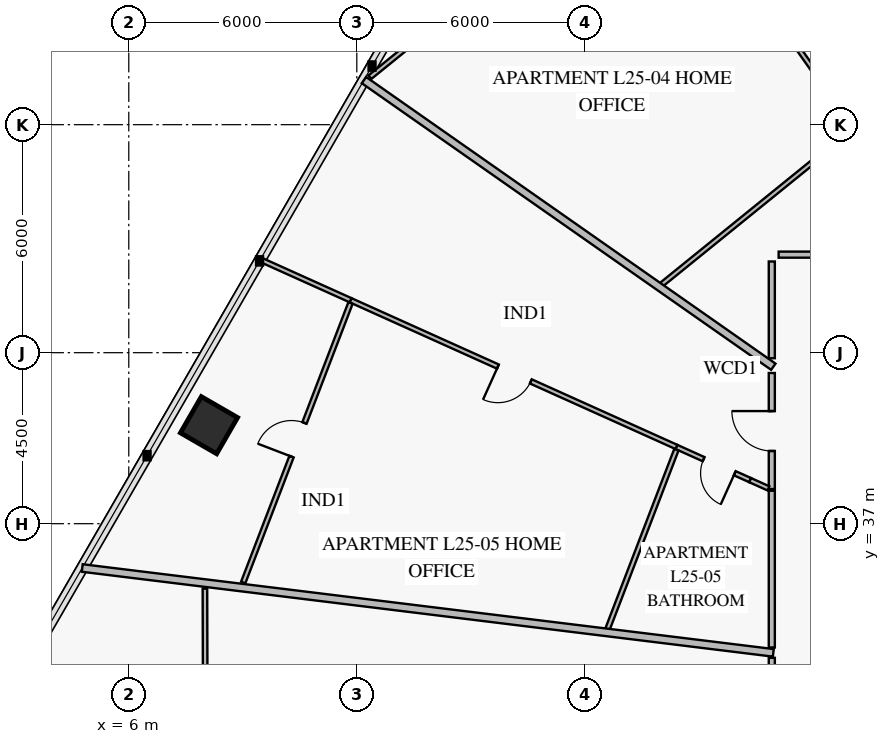
"""IFC4 building model, lengths in metres.
Left out: names, types, materials, properties, quantities, classifications, styles, units other than length and angle.
Written with IfcOpenShell. Run it as: python <this file> out.ifc"""

import sys

from ifc_helpers import new_model, si_unit, direction, frame, frame_2d, origin, origin_2d, place, context, subcontext, project, spatial, rectangle, extrude, element, fill, save


model = new_model("IFC4")
c1 = context("Model", 3, precision=1e-05, world=origin(), true_north=direction((0.0, 1.0)))
c2 = subcontext(c1, "Body", "Model", "MODEL_VIEW")
j1 = project(units=[si_unit("LENGTHUNIT", "METRE"), si_unit("PLANEANGLEUNIT", "RADIAN")], contexts=[c1])
p1 = place(None, origin())
s1 = spatial("IfcSite", under=j1, at=p1, CompositionType="ELEMENT")
p2 = place(p1, origin())
s2 = spatial("IfcBuilding", under=s1, at=p2, CompositionType="ELEMENT")
p3 = place(p2, frame((0.0, 0.0, 103.8)))
s3 = spatial("IfcBuildingStorey", under=s2, at=p3, CompositionType="ELEMENT", Elevation=103.8)
p4 = place(p3, frame((8.111, 39.592, 0.0), z_axis=(0.0, 0.0, 1.0), x_axis=(-0.5, -0.866025403784, 0.0)))
e1 = element("IfcColumn", 1, at=p4, inside=s3, PredefinedType="COLUMN", context=c2, shape_type="SweptSolid", body=[
    extrude(rectangle(XDim=1.1, YDim=1.1, at=origin_2d()), origin(), (0.0, 0.0, 1.0), 3.55),
])
p5 = place(p3, frame((25.085, 47.427, 0.0), z_axis=(0.0, 0.0, 1.0), x_axis=(-0.577572190058, 0.81633961393, 0.0)))
e2 = element("IfcWall", 2, at=p5, inside=s3, PredefinedType="PARTITIONING", context=c2, shape_type="SweptSolid", body=[
    extrude(rectangle(XDim=7.275, YDim=0.12, at=frame_2d((3.638, 0.0))), origin(), (0.0, 0.0, 1.0), 3.1),
])
p6 = place(p5, frame((4.044, 0.0, 0.0)))
e3 = element("IfcOpeningElement", 3, at=p6, cuts=e2, PredefinedType="OPENING", context=c2, shape_type="SweptSolid", body=[
    extrude(rectangle(XDim=0.95, YDim=2.1, at=frame_2d((0.475, 1.05))), frame((0.0, 0.072, 0.0), z_axis=(0.0, -1.0, 0.0), x_axis=(1.0, 0.0, 0.0)), (0.0, 0.0, 1.0), 0.144),
])
p7 = place(p3, frame((19.797, 54.784, 0.0), z_axis=(0.0, 0.0, 1.0), x_axis=(-0.777151172812, -0.629313955508, 0.0)))
e4 = element("IfcWall", 4, at=p7, inside=s3, PredefinedType="PARTITIONING", context=c2, shape_type="SweptSolid", body=[
    extrude(rectangle(XDim=9.588, YDim=0.12, at=frame_2d((4.794, 0.0))), origin(), (0.0, 0.0, 1.0), 2.8),
])
p8 = place(p7, frame((2.552, 0.0, 0.0)))
e5 = element("IfcOpeningElement", 5, at=p8, cuts=e4, PredefinedType="OPENING", context=c2, shape_type="SweptSolid", body=[
    extrude(rectangle(XDim=0.95, YDim=2.1, at=frame_2d((0.475, 1.05))), frame((0.0, 0.072, 0.0), z_axis=(0.0, -1.0, 0.0), x_axis=(1.0, 0.0, 0.0)), (0.0, 0.0, 1.0), 0.144),
])
p9 = place(p3, frame((22.35, 38.146, 0.0), z_axis=(0.0, 0.0, 1.0), x_axis=(-0.911826982845, 0.410574662341, 0.0)))
e6 = element("IfcWall", 6, at=p9, inside=s3, PredefinedType="PARTITIONING", context=c2, shape_type="SweptSolid", body=[
    extrude(rectangle(XDim=2.127, YDim=0.12, at=frame_2d((1.063, 0.0))), origin(), (0.0, 0.0, 1.0), 3.55),
])
p10 = place(p9, frame((0.443, 0.0, 0.0)))
e7 = element("IfcOpeningElement", 7, at=p10, cuts=e6, PredefinedType="OPENING", context=c2, shape_type="SweptSolid", body=[
    extrude(rectangle(XDim=0.9, YDim=2.1, at=frame_2d((0.45, 1.05))), frame((0.0, 0.072, 0.0), z_axis=(0.0, -1.0, 0.0), x_axis=(1.0, 0.0, 0.0)), (0.0, 0.0, 1.0), 0.144),
])
p11 = place(p3, frame((20.411, 39.019, 0.0), z_axis=(0.0, 0.0, 1.0), x_axis=(-0.911837449282, 0.410551417104, 0.0)))
e8 = element("IfcWall", 8, at=p11, inside=s3, PredefinedType="PARTITIONING", context=c2, shape_type="SweptSolid", body=[
    extrude(rectangle(XDim=9.404, YDim=0.12, at=frame_2d((4.702, 0.0))), origin(), (0.0, 0.0, 1.0), 3.1),
])
p12 = place(p11, frame((4.202, 0.0, 0.0)))
e9 = element("IfcOpeningElement", 9, at=p12, cuts=e8, PredefinedType="OPENING", context=c2, shape_type="SweptSolid", body=[
    extrude(rectangle(XDim=0.95, YDim=2.1, at=frame_2d((0.475, 1.05))), frame((0.0, 0.072, 0.0), z_axis=(0.0, -1.0, 0.0), x_axis=(1.0, 0.0, 0.0)), (0.0, 0.0, 1.0), 0.144),
])
p13 = place(p3, frame((11.834, 42.806, 0.0), z_axis=(0.0, 0.0, 1.0), x_axis=(-0.358347623064, -0.933588228848, 0.0)))
e10 = element("IfcWall", 10, at=p13, inside=s3, PredefinedType="PARTITIONING", context=c2, shape_type="SweptSolid", body=[
    extrude(rectangle(XDim=7.877, YDim=0.12, at=frame_2d((3.938, 0.0))), origin(), (0.0, 0.0, 1.0), 2.85),
])
p14 = place(p13, frame((3.379, 0.0, 0.0)))
e11 = element("IfcOpeningElement", 11, at=p14, cuts=e10, PredefinedType="OPENING", context=c2, shape_type="SweptSolid", body=[
    extrude(rectangle(XDim=0.95, YDim=2.1, at=frame_2d((0.475, 1.05))), frame((0.0, 0.072, 0.0), z_axis=(0.0, -1.0, 0.0), x_axis=(1.0, 0.0, 0.0)), (0.0, 0.0, 1.0), 0.144),
])
p15 = place(p3, frame((22.92, 40.965, 0.0), z_axis=(0.0, 0.0, 1.0), x_axis=(0.0, -1.0, 0.0)))
e12 = element("IfcWall", 12, at=p15, inside=s3, PredefinedType="PARTITIONING", context=c2, shape_type="SweptSolid", body=[
    extrude(rectangle(XDim=3.054, YDim=0.16, at=frame_2d((1.527, 0.0))), origin(), (0.0, 0.0, 1.0), 3.55),
])
p16 = place(p15, frame((1.002, 0.0, 0.0)))
e13 = element("IfcOpeningElement", 13, at=p16, cuts=e12, PredefinedType="OPENING", context=c2, shape_type="SweptSolid", body=[
    extrude(rectangle(XDim=1.05, YDim=2.15, at=frame_2d((0.525, 1.075))), frame((0.0, 0.092, 0.0), z_axis=(0.0, -1.0, 0.0), x_axis=(1.0, 0.0, 0.0)), (0.0, 0.0, 1.0), 0.184),
])
p17 = place(p3, frame((8.004, 35.29, 0.0), z_axis=(0.0, 0.0, 1.0), x_axis=(0.00282658773, -0.999996005193, 0.0)))
e14 = element("IfcWall", 14, at=p17, inside=s3, PredefinedType="PARTITIONING", context=c2, shape_type="SweptSolid", body=[
    extrude(rectangle(XDim=6.737, YDim=0.12, at=frame_2d((3.369, 0.0))), origin(), (0.0, 0.0, 1.0), 2.8),
])
p18 = place(p17, frame((2.894, 0.0, 0.0)))
e15 = element("IfcOpeningElement", 15, at=p18, cuts=e14, PredefinedType="OPENING", context=c2, shape_type="SweptSolid", body=[
    extrude(rectangle(XDim=0.95, YDim=2.1, at=frame_2d((0.475, 1.05))), frame((0.0, 0.072, 0.0), z_axis=(0.0, -1.0, 0.0), x_axis=(1.0, 0.0, 0.0)), (0.0, 0.0, 1.0), 0.144),
])
p19 = place(p3, frame((22.92, 33.47, 0.0), z_axis=(0.0, 0.0, 1.0), x_axis=(0.0, -1.0, 0.0)))
e16 = element("IfcWall", 16, at=p19, inside=s3, PredefinedType="PARTITIONING", context=c2, shape_type="SweptSolid", body=[
    extrude(rectangle(XDim=3.014, YDim=0.16, at=frame_2d((1.507, 0.0))), origin(), (0.0, 0.0, 1.0), 3.55),
])
p20 = place(p19, frame((0.982, 0.0, 0.0)))
e17 = element("IfcOpeningElement", 17, at=p20, cuts=e16, PredefinedType="OPENING", context=c2, shape_type="SweptSolid", body=[
    extrude(rectangle(XDim=1.05, YDim=2.15, at=frame_2d((0.525, 1.075))), frame((0.0, 0.092, 0.0), z_axis=(0.0, -1.0, 0.0), x_axis=(1.0, 0.0, 0.0)), (0.0, 0.0, 1.0), 0.184),
])
p21 = place(p3, frame((30.889, 44.04, 0.0), z_axis=(0.0, 0.0, 1.0), x_axis=(-0.39073950449, 0.920501298006, 0.0)))
e18 = element("IfcWall", 18, at=p21, inside=s3, PredefinedType="PARTITIONING", context=c2, shape_type="SweptSolid", body=[
    extrude(rectangle(XDim=18.38, YDim=0.2, at=frame_2d((9.19, 0.0))), origin(), (0.0, 0.0, 1.0), 2.8),
])
p22 = place(p3, frame((25.046, 47.364, 0.0), z_axis=(0.0, 0.0, 1.0), x_axis=(-0.777136993878, -0.629331464926, 0.0)))
e19 = element("IfcWall", 19, at=p22, inside=s3, PredefinedType="PARTITIONING", context=c2, shape_type="SweptSolid", body=[
    extrude(rectangle(XDim=6.483, YDim=0.12, at=frame_2d((3.242, 0.0))), origin(), (0.0, 0.0, 1.0), 2.85),
])
p23 = place(p3, frame((22.96, 41.131, 0.0), z_axis=(0.0, 0.0, 1.0), x_axis=(-0.819148180014, 0.573581955068, 0.0)))
e20 = element("IfcWall", 20, at=p23, inside=s3, PredefinedType="PARTITIONING", context=c2, shape_type="SweptSolid", body=[
    extrude(rectangle(XDim=13.15, YDim=0.2, at=frame_2d((6.575, 0.0))), origin(), (0.0, 0.0, 1.0), 2.8),
])
p24 = place(p3, frame((22.832, 37.929, 0.0), z_axis=(0.0, 0.0, 1.0), x_axis=(-0.911800467551, 0.410633543897, 0.0)))
e21 = element("IfcWall", 21, at=p24, inside=s3, PredefinedType="PARTITIONING", context=c2, shape_type="SweptSolid", body=[
    extrude(rectangle(XDim=0.529, YDim=0.12, at=frame_2d((0.264, 0.0))), origin(), (0.0, 0.0, 1.0), 3.55),
])
p25 = place(p3, frame((11.836, 42.88, 0.0), z_axis=(0.0, 0.0, 1.0), x_axis=(-0.911821705631, 0.410586382068, 0.0)))
e22 = element("IfcWall", 22, at=p25, inside=s3, PredefinedType="PARTITIONING", context=c2, shape_type="SweptSolid", body=[
    extrude(rectangle(XDim=2.61, YDim=0.12, at=frame_2d((1.305, 0.0))), origin(), (0.0, 0.0, 1.0), 2.8),
])
p26 = place(p3, frame((20.409, 38.945, 0.0), z_axis=(0.0, 0.0, 1.0), x_axis=(-0.358374938657, -0.933577743598, 0.0)))
e23 = element("IfcWall", 23, at=p26, inside=s3, PredefinedType="PARTITIONING", context=c2, shape_type="SweptSolid", body=[
    extrude(rectangle(XDim=5.092, YDim=0.12, at=frame_2d((2.546, 0.0))), origin(), (0.0, 0.0, 1.0), 2.85),
])
p27 = place(p3, frame((22.96, 33.601, 0.0), z_axis=(0.0, 0.0, 1.0), x_axis=(-0.99254551981, 0.121874489148, 0.0)))
e24 = element("IfcWall", 24, at=p27, inside=s3, PredefinedType="PARTITIONING", context=c2, shape_type="SweptSolid", body=[
    extrude(rectangle(XDim=18.321, YDim=0.2, at=frame_2d((9.161, 0.0))), origin(), (0.0, 0.0, 1.0), 2.8),
])
p28 = place(p3, frame((27.37, 44.08, 0.0), z_axis=(0.0, 0.0, 1.0), x_axis=(-1.0, 0.0, 0.0)))
e25 = element("IfcWall", 25, at=p28, inside=s3, PredefinedType="PARTITIONING", context=c2, shape_type="SweptSolid", body=[
    extrude(rectangle(XDim=4.27, YDim=0.16, at=frame_2d((2.135, 0.0))), origin(), (0.0, 0.0, 1.0), 2.85),
])
p29 = place(p3, frame((22.92, 43.9, 0.0), z_axis=(0.0, 0.0, 1.0), x_axis=(0.0, -1.0, 0.0)))
e26 = element("IfcWall", 26, at=p29, inside=s3, PredefinedType="PARTITIONING", context=c2, shape_type="SweptSolid", body=[
    extrude(rectangle(XDim=2.545, YDim=0.16, at=frame_2d((1.273, 0.0))), origin(), (0.0, 0.0, 1.0), 3.55),
])
p30 = place(p3, frame((22.92, 37.867, 0.0), z_axis=(0.0, 0.0, 1.0), x_axis=(0.0, -1.0, 0.0)))
e27 = element("IfcWall", 27, at=p30, inside=s3, PredefinedType="PARTITIONING", context=c2, shape_type="SweptSolid", body=[
    extrude(rectangle(XDim=4.125, YDim=0.16, at=frame_2d((2.062, 0.0))), origin(), (0.0, 0.0, 1.0), 2.85),
])
p31 = place(p10, origin())
e28 = element("IfcDoor", 28, at=p31, inside=s3, OperationType="SINGLE_SWING_LEFT", PredefinedType="DOOR", context=c2, shape_type="SweptSolid", body=[
    extrude(rectangle(XDim=0.9, YDim=2.1, at=frame_2d((0.45, 1.05))), frame((0.0, 0.025, 0.0), z_axis=(0.0, -1.0, 0.0), x_axis=(1.0, 0.0, 0.0)), (0.0, 0.0, 1.0), 0.05),
])
fill(e7, e28)
p32 = place(p12, origin())
e29 = element("IfcDoor", 29, at=p32, inside=s3, OperationType="SINGLE_SWING_RIGHT", PredefinedType="DOOR", context=c2, shape_type="SweptSolid", body=[
    extrude(rectangle(XDim=0.95, YDim=2.1, at=frame_2d((0.475, 1.05))), frame((0.0, 0.025, 0.0), z_axis=(0.0, -1.0, 0.0), x_axis=(1.0, 0.0, 0.0)), (0.0, 0.0, 1.0), 0.05),
])
fill(e9, e29)
p33 = place(p14, frame((0.95, 0.0, 0.0), z_axis=(0.0, 0.0, 1.0), x_axis=(-1.0, 0.0, 0.0)))
e30 = element("IfcDoor", 30, at=p33, inside=s3, OperationType="SINGLE_SWING_LEFT", PredefinedType="DOOR", context=c2, shape_type="SweptSolid", body=[
    extrude(rectangle(XDim=0.95, YDim=2.1, at=frame_2d((0.475, 1.05))), frame((0.0, 0.025, 0.0), z_axis=(0.0, -1.0, 0.0), x_axis=(1.0, 0.0, 0.0)), (0.0, 0.0, 1.0), 0.05),
])
fill(e11, e30)
p34 = place(p16, frame((1.05, 0.0, 0.0), z_axis=(0.0, 0.0, 1.0), x_axis=(-1.0, 0.0, 0.0)))
e31 = element("IfcDoor", 31, at=p34, inside=s3, OperationType="SINGLE_SWING_RIGHT", PredefinedType="DOOR", context=c2, shape_type="SweptSolid", body=[
    extrude(rectangle(XDim=1.05, YDim=2.15, at=frame_2d((0.525, 1.075))), frame((0.0, 0.025, 0.0), z_axis=(0.0, -1.0, 0.0), x_axis=(1.0, 0.0, 0.0)), (0.0, 0.0, 1.0), 0.05),
])
fill(e13, e31)
save(model, sys.argv[1])
